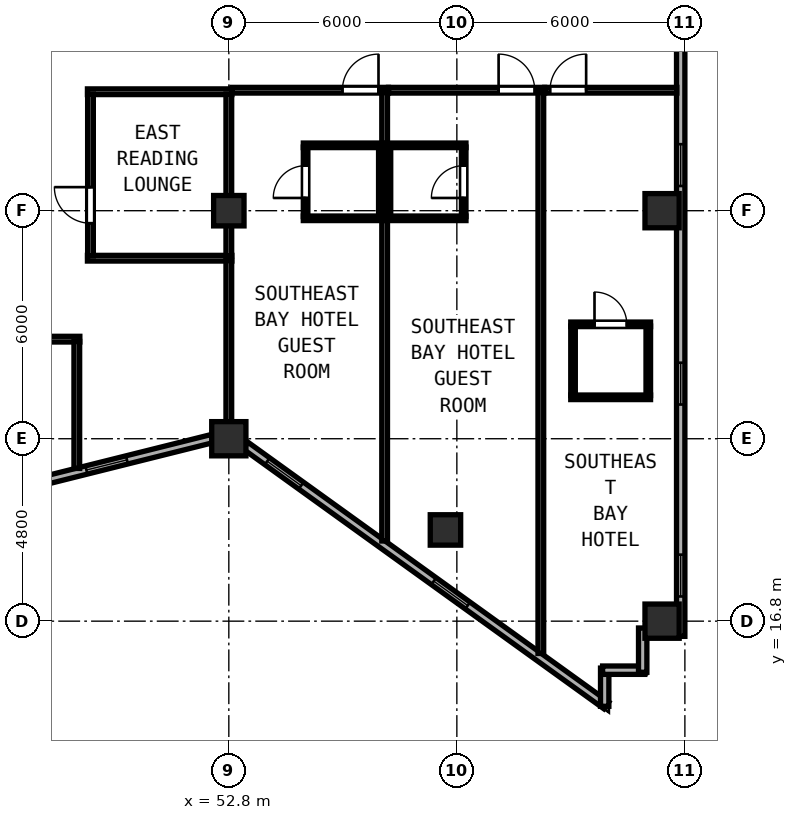
"""IFC4 building model, lengths in metres.
Left out: names, types, materials, properties, quantities, classifications, styles, units other than length and angle.
Written with IfcOpenShell. Run it as: python <this file> out.ifc"""

import sys

from ifc_helpers import new_model, si_unit, direction, frame, frame_2d, origin, origin_2d, place, context, subcontext, project, spatial, rectangle, hollow_rectangle, extrude, element, fill, save


model = new_model("IFC4")
c1 = context("Model", 3, precision=1e-05, world=origin(), true_north=direction((0.0, 1.0)))
c2 = subcontext(c1, "Body", "Model", "MODEL_VIEW")
j1 = project(units=[si_unit("LENGTHUNIT", "METRE"), si_unit("PLANEANGLEUNIT", "RADIAN")], contexts=[c1])
p1 = place(None, origin())
s1 = spatial("IfcSite", under=j1, at=p1, CompositionType="ELEMENT")
p2 = place(p1, origin())
s2 = spatial("IfcBuilding", under=s1, at=p2, CompositionType="ELEMENT")
p3 = place(p2, frame((0.0, 0.0, 223.0)))
s3 = spatial("IfcBuildingStorey", under=s2, at=p3, CompositionType="ELEMENT", Elevation=223.0)
for number, where, z_axis, x_axis in (
    (1, (52.8, 21.6, 0.0), (0.0, 0.0, 1.0), (1.0, 0.0, 0.0)),
    (2, (64.2, 16.8, 0.0), (0.0, 0.0, 1.0), (1.0, 0.0, 0.0)),
    (3, (64.2, 27.6, 0.0), (0.0, 0.0, 1.0), (1.0, 0.0, 0.0)),
):
    element("IfcColumn", number, at=place(p3, frame(where, z_axis=z_axis, x_axis=x_axis)), inside=s3, PredefinedType="COLUMN", context=c2, shape_type="SweptSolid", body=[
        extrude(hollow_rectangle(XDim=0.9, YDim=0.9, WallThickness=0.034, at=origin_2d()), origin(), (0.0, 0.0, 1.0), 3.8),
    ])
for number, where, z_axis, x_axis in (
    (4, (52.8, 27.6, 0.0), (0.0, 0.0, 1.0), (1.0, 0.0, 0.0)),
    (5, (58.5, 19.2, 0.0), (0.0, 0.0, 1.0), (1.0, 0.0, 0.0)),
):
    element("IfcColumn", number, at=place(p3, frame(where, z_axis=z_axis, x_axis=x_axis)), inside=s3, PredefinedType="COLUMN", context=c2, shape_type="SweptSolid", body=[
        extrude(hollow_rectangle(XDim=0.8, YDim=0.8, WallThickness=0.03, at=origin_2d()), origin(), (0.0, 0.0, 1.0), 3.8),
    ])
p4 = place(p3, frame((47.933, 20.497, 0.0), z_axis=(0.0, 0.0, 1.0), x_axis=(0.970142500145, 0.242535625036, 0.0)))
e6 = element("IfcWall", 6, at=p4, inside=s3, PredefinedType="SOLIDWALL", context=c2, shape_type="SweptSolid", body=[
    extrude(rectangle(XDim=4.561, YDim=0.22, at=frame_2d((2.281, 0.0))), origin(), (0.0, 0.0, 1.0), 3.215),
])
p5 = place(p4, frame((1.154, 0.0, 0.85)))
e7 = element("IfcOpeningElement", 7, at=p5, cuts=e6, PredefinedType="OPENING", context=c2, shape_type="SweptSolid", body=[
    extrude(rectangle(XDim=1.1, YDim=1.75, at=frame_2d((0.55, 0.875))), frame((0.0, 0.12, 0.0), z_axis=(0.0, -1.0, 0.0), x_axis=(1.0, 0.0, 0.0)), (0.0, 0.0, 1.0), 0.24),
])
p6 = place(p3, frame((53.242, 21.417, 0.0), z_axis=(0.0, 0.0, 1.0), x_axis=(0.811534737332, -0.58430417601, 0.0)))
e8 = element("IfcWall", 8, at=p6, inside=s3, PredefinedType="SOLIDWALL", context=c2, shape_type="SweptSolid", body=[
    extrude(rectangle(XDim=11.697, YDim=0.22, at=frame_2d((5.849, 0.0))), origin(), (0.0, 0.0, 1.0), 3.215),
])
p7 = place(p6, frame((0.7, 0.0, 0.85)))
e9 = element("IfcOpeningElement", 9, at=p7, cuts=e8, PredefinedType="OPENING", context=c2, shape_type="SweptSolid", body=[
    extrude(rectangle(XDim=1.1, YDim=1.75, at=frame_2d((0.55, 0.875))), frame((0.0, 0.12, 0.0), z_axis=(0.0, -1.0, 0.0), x_axis=(1.0, 0.0, 0.0)), (0.0, 0.0, 1.0), 0.24),
])
p8 = place(p6, frame((6.1, 0.0, 0.85)))
e10 = element("IfcOpeningElement", 10, at=p8, cuts=e8, PredefinedType="OPENING", context=c2, shape_type="SweptSolid", body=[
    extrude(rectangle(XDim=1.1, YDim=1.75, at=frame_2d((0.55, 0.875))), frame((0.0, 0.12, 0.0), z_axis=(0.0, -1.0, 0.0), x_axis=(1.0, 0.0, 0.0)), (0.0, 0.0, 1.0), 0.24),
])
p9 = place(p3, frame((62.69, 14.56, 0.0), z_axis=(0.0, 0.0, 1.0), x_axis=(0.0, 1.0, 0.0)))
e11 = element("IfcWall", 11, at=p9, inside=s3, PredefinedType="SOLIDWALL", context=c2, shape_type="SweptSolid", body=[
    extrude(rectangle(XDim=1.005, YDim=0.22, at=frame_2d((0.502, 0.0))), origin(), (0.0, 0.0, 1.0), 3.62),
])
p10 = place(p3, frame((62.635, 15.51, 0.0), z_axis=(0.0, 0.0, 1.0), x_axis=(1.0, 0.0, 0.0)))
e12 = element("IfcWall", 12, at=p10, inside=s3, PredefinedType="SOLIDWALL", context=c2, shape_type="SweptSolid", body=[
    extrude(rectangle(XDim=1.11, YDim=0.22, at=frame_2d((0.555, 0.0))), origin(), (0.0, 0.0, 1.0), 3.62),
])
p11 = place(p3, frame((63.69, 15.455, 0.0), z_axis=(0.0, 0.0, 1.0), x_axis=(0.0, 1.0, 0.0)))
e13 = element("IfcWall", 13, at=p11, inside=s3, PredefinedType="SOLIDWALL", context=c2, shape_type="SweptSolid", body=[
    extrude(rectangle(XDim=1.165, YDim=0.22, at=frame_2d((0.583, 0.0))), origin(), (0.0, 0.0, 1.0), 3.62),
])
p12 = place(p3, frame((64.69, 16.4, 0.0), z_axis=(0.0, 0.0, 1.0), x_axis=(0.0, 1.0, 0.0)))
e14 = element("IfcWall", 14, at=p12, inside=s3, PredefinedType="SOLIDWALL", context=c2, shape_type="SweptSolid", body=[
    extrude(rectangle(XDim=21.145, YDim=0.22, at=frame_2d((10.573, 0.0))), origin(), (0.0, 0.0, 1.0), 3.62),
])
p13 = place(p12, frame((1.05, 0.0, 0.85)))
e15 = element("IfcOpeningElement", 15, at=p13, cuts=e14, PredefinedType="OPENING", context=c2, shape_type="SweptSolid", body=[
    extrude(rectangle(XDim=1.1, YDim=1.75, at=frame_2d((0.55, 0.875))), frame((0.0, 0.12, 0.0), z_axis=(0.0, -1.0, 0.0), x_axis=(1.0, 0.0, 0.0)), (0.0, 0.0, 1.0), 0.24),
])
p14 = place(p12, frame((6.1, 0.0, 0.85)))
e16 = element("IfcOpeningElement", 16, at=p14, cuts=e14, PredefinedType="OPENING", context=c2, shape_type="SweptSolid", body=[
    extrude(rectangle(XDim=1.1, YDim=1.75, at=frame_2d((0.55, 0.875))), frame((0.0, 0.12, 0.0), z_axis=(0.0, -1.0, 0.0), x_axis=(1.0, 0.0, 0.0)), (0.0, 0.0, 1.0), 0.24),
])
p15 = place(p12, frame((11.85, 0.0, 0.85)))
e17 = element("IfcOpeningElement", 17, at=p15, cuts=e14, PredefinedType="OPENING", context=c2, shape_type="SweptSolid", body=[
    extrude(rectangle(XDim=1.1, YDim=1.75, at=frame_2d((0.55, 0.875))), frame((0.0, 0.12, 0.0), z_axis=(0.0, -1.0, 0.0), x_axis=(1.0, 0.0, 0.0)), (0.0, 0.0, 1.0), 0.24),
])
p16 = place(p12, frame((16.9, 0.0, 0.85)))
e18 = element("IfcOpeningElement", 18, at=p16, cuts=e14, PredefinedType="OPENING", context=c2, shape_type="SweptSolid", body=[
    extrude(rectangle(XDim=1.1, YDim=1.75, at=frame_2d((0.55, 0.875))), frame((0.0, 0.12, 0.0), z_axis=(0.0, -1.0, 0.0), x_axis=(1.0, 0.0, 0.0)), (0.0, 0.0, 1.0), 0.24),
])
for number, where, z_axis, x_axis in (
    (19, (49.08, 30.73, 0.0), (0.0, 0.0, 1.0), (1.0, 0.0, 0.0)),
    (20, (49.08, 26.35, 0.0), (0.0, 0.0, 1.0), (1.0, 0.0, 0.0)),
):
    element("IfcWall", number, at=place(p3, frame(where, z_axis=z_axis, x_axis=x_axis)), inside=s3, PredefinedType="PARTITIONING", context=c2, shape_type="SweptSolid", body=[
        extrude(rectangle(XDim=3.8, YDim=0.15, at=frame_2d((1.9, 0.0))), origin(), (0.0, 0.0, 1.0), 3.62),
    ])
p17 = place(p3, frame((49.16, 26.41, 0.0), z_axis=(0.0, 0.0, 1.0), x_axis=(0.0, 1.0, 0.0)))
e21 = element("IfcWall", 21, at=p17, inside=s3, PredefinedType="PARTITIONING", context=c2, shape_type="SweptSolid", body=[
    extrude(rectangle(XDim=4.26, YDim=0.15, at=frame_2d((2.13, 0.0))), origin(), (0.0, 0.0, 1.0), 3.62),
])
p18 = place(p17, frame((0.86, 0.0, 0.0)))
e22 = element("IfcOpeningElement", 22, at=p18, cuts=e21, PredefinedType="OPENING", context=c2, shape_type="SweptSolid", body=[
    extrude(rectangle(XDim=0.95, YDim=2.12, at=frame_2d((0.475, 1.06))), frame((0.0, 0.085, 0.0), z_axis=(0.0, -1.0, 0.0), x_axis=(1.0, 0.0, 0.0)), (0.0, 0.0, 1.0), 0.17),
])
p19 = place(p3, frame((52.8, 26.41, 0.0), z_axis=(0.0, 0.0, 1.0), x_axis=(0.0, 1.0, 0.0)))
e23 = element("IfcWall", 23, at=p19, inside=s3, PredefinedType="PARTITIONING", context=c2, shape_type="SweptSolid", body=[
    extrude(rectangle(XDim=4.26, YDim=0.15, at=frame_2d((2.13, 0.0))), origin(), (0.0, 0.0, 1.0), 3.215),
])
p20 = place(p3, frame((41.682, 24.22, 0.0), z_axis=(0.0, 0.0, 1.0), x_axis=(1.0, 0.0, 0.0)))
e24 = element("IfcWall", 24, at=p20, inside=s3, PredefinedType="PARTITIONING", context=c2, shape_type="SweptSolid", body=[
    extrude(rectangle(XDim=7.198, YDim=0.15, at=frame_2d((3.599, 0.0))), origin(), (0.0, 0.0, 1.0), 3.62),
])
p21 = place(p20, frame((3.913, 0.0, 0.0), z_axis=(0.0, 0.0, 1.0), x_axis=(-1.0, 0.0, 0.0)))
e25 = element("IfcOpeningElement", 25, at=p21, cuts=e24, PredefinedType="OPENING", context=c2, shape_type="SweptSolid", body=[
    extrude(rectangle(XDim=0.95, YDim=2.12, at=frame_2d((0.475, 1.06))), frame((0.0, 0.085, 0.0), z_axis=(0.0, -1.0, 0.0), x_axis=(1.0, 0.0, 0.0)), (0.0, 0.0, 1.0), 0.17),
])
p22 = place(p3, frame((48.8, 20.819, 0.0), z_axis=(0.0, 0.0, 1.0), x_axis=(0.0, 1.0, 0.0)))
e26 = element("IfcWall", 26, at=p22, inside=s3, PredefinedType="PARTITIONING", context=c2, shape_type="SweptSolid", body=[
    extrude(rectangle(XDim=3.341, YDim=0.15, at=frame_2d((1.671, 0.0))), origin(), (0.0, 0.0, 1.0), 3.62),
])
p23 = place(p3, frame((52.882, 30.77, 0.0), z_axis=(0.0, 0.0, 1.0), x_axis=(1.0, 0.0, 0.0)))
e27 = element("IfcWall", 27, at=p23, inside=s3, PredefinedType="PARTITIONING", context=c2, shape_type="SweptSolid", body=[
    extrude(rectangle(XDim=4.118, YDim=0.15, at=frame_2d((2.059, 0.0))), origin(), (0.0, 0.0, 1.0), 3.62),
])
p24 = place(p23, frame((3.856, 0.0, 0.0), z_axis=(0.0, 0.0, 1.0), x_axis=(-1.0, 0.0, 0.0)))
e28 = element("IfcOpeningElement", 28, at=p24, cuts=e27, PredefinedType="OPENING", context=c2, shape_type="SweptSolid", body=[
    extrude(rectangle(XDim=0.95, YDim=2.15, at=frame_2d((0.475, 1.075))), frame((0.0, 0.085, 0.0), z_axis=(0.0, -1.0, 0.0), x_axis=(1.0, 0.0, 0.0)), (0.0, 0.0, 1.0), 0.17),
])
p25 = place(p3, frame((52.8, 21.819, 0.0), z_axis=(0.0, 0.0, 1.0), x_axis=(0.0, 1.0, 0.0)))
e29 = element("IfcWall", 29, at=p25, inside=s3, PredefinedType="PARTITIONING", context=c2, shape_type="SweptSolid", body=[
    extrude(rectangle(XDim=4.471, YDim=0.15, at=frame_2d((2.236, 0.0))), origin(), (0.0, 0.0, 1.0), 3.215),
])
p26 = place(p3, frame((56.9, 18.909, 0.0), z_axis=(0.0, 0.0, 1.0), x_axis=(0.0, 1.0, 0.0)))
e30 = element("IfcWall", 30, at=p26, inside=s3, PredefinedType="PARTITIONING", context=c2, shape_type="SweptSolid", body=[
    extrude(rectangle(XDim=11.801, YDim=0.15, at=frame_2d((5.9, 0.0))), origin(), (0.0, 0.0, 1.0), 3.62),
])
p27 = place(p3, frame((54.76, 29.32, 0.0), z_axis=(0.0, 0.0, 1.0), x_axis=(1.0, 0.0, 0.0)))
e31 = element("IfcWall", 31, at=p27, inside=s3, PredefinedType="PARTITIONING", context=c2, shape_type="SweptSolid", body=[
    extrude(rectangle(XDim=2.08, YDim=0.12, at=frame_2d((1.04, 0.0))), origin(), (0.0, 0.0, 1.0), 3.62),
])
p28 = place(p3, frame((54.76, 27.4, 0.0), z_axis=(0.0, 0.0, 1.0), x_axis=(1.0, 0.0, 0.0)))
e32 = element("IfcWall", 32, at=p28, inside=s3, PredefinedType="PARTITIONING", context=c2, shape_type="SweptSolid", body=[
    extrude(rectangle(XDim=2.08, YDim=0.12, at=frame_2d((1.04, 0.0))), origin(), (0.0, 0.0, 1.0), 3.215),
])
p29 = place(p3, frame((54.82, 27.445, 0.0), z_axis=(0.0, 0.0, 1.0), x_axis=(0.0, 1.0, 0.0)))
e33 = element("IfcWall", 33, at=p29, inside=s3, PredefinedType="PARTITIONING", context=c2, shape_type="SweptSolid", body=[
    extrude(rectangle(XDim=1.83, YDim=0.12, at=frame_2d((0.915, 0.0))), origin(), (0.0, 0.0, 1.0), 3.62),
])
p30 = place(p29, frame((1.34, 0.0, 0.0), z_axis=(0.0, 0.0, 1.0), x_axis=(-1.0, 0.0, 0.0)))
e34 = element("IfcOpeningElement", 34, at=p30, cuts=e33, PredefinedType="OPENING", context=c2, shape_type="SweptSolid", body=[
    extrude(rectangle(XDim=0.85, YDim=2.1, at=frame_2d((0.425, 1.05))), frame((0.0, 0.07, 0.0), z_axis=(0.0, -1.0, 0.0), x_axis=(1.0, 0.0, 0.0)), (0.0, 0.0, 1.0), 0.14),
])
p31 = place(p3, frame((56.8, 27.445, 0.0), z_axis=(0.0, 0.0, 1.0), x_axis=(0.0, 1.0, 0.0)))
e35 = element("IfcWall", 35, at=p31, inside=s3, PredefinedType="PARTITIONING", context=c2, shape_type="SweptSolid", body=[
    extrude(rectangle(XDim=1.83, YDim=0.12, at=frame_2d((0.915, 0.0))), origin(), (0.0, 0.0, 1.0), 3.62),
])
p32 = place(p3, frame((57.002, 30.77, 0.0), z_axis=(0.0, 0.0, 1.0), x_axis=(1.0, 0.0, 0.0)))
e36 = element("IfcWall", 36, at=p32, inside=s3, PredefinedType="PARTITIONING", context=c2, shape_type="SweptSolid", body=[
    extrude(rectangle(XDim=4.108, YDim=0.15, at=frame_2d((2.054, 0.0))), origin(), (0.0, 0.0, 1.0), 3.62),
])
p33 = place(p32, frame((3.846, 0.0, 0.0), z_axis=(0.0, 0.0, 1.0), x_axis=(-1.0, 0.0, 0.0)))
e37 = element("IfcOpeningElement", 37, at=p33, cuts=e36, PredefinedType="OPENING", context=c2, shape_type="SweptSolid", body=[
    extrude(rectangle(XDim=0.95, YDim=2.15, at=frame_2d((0.475, 1.075))), frame((0.0, 0.085, 0.0), z_axis=(0.0, -1.0, 0.0), x_axis=(1.0, 0.0, 0.0)), (0.0, 0.0, 1.0), 0.17),
])
p34 = place(p3, frame((61.01, 15.95, 0.0), z_axis=(0.0, 0.0, 1.0), x_axis=(0.0, 1.0, 0.0)))
e38 = element("IfcWall", 38, at=p34, inside=s3, PredefinedType="PARTITIONING", context=c2, shape_type="SweptSolid", body=[
    extrude(rectangle(XDim=14.76, YDim=0.15, at=frame_2d((7.38, 0.0))), origin(), (0.0, 0.0, 1.0), 3.62),
])
p35 = place(p3, frame((56.96, 29.32, 0.0), z_axis=(0.0, 0.0, 1.0), x_axis=(1.0, 0.0, 0.0)))
e39 = element("IfcWall", 39, at=p35, inside=s3, PredefinedType="PARTITIONING", context=c2, shape_type="SweptSolid", body=[
    extrude(rectangle(XDim=2.08, YDim=0.12, at=frame_2d((1.04, 0.0))), origin(), (0.0, 0.0, 1.0), 3.62),
])
p36 = place(p3, frame((56.96, 27.4, 0.0), z_axis=(0.0, 0.0, 1.0), x_axis=(1.0, 0.0, 0.0)))
e40 = element("IfcWall", 40, at=p36, inside=s3, PredefinedType="PARTITIONING", context=c2, shape_type="SweptSolid", body=[
    extrude(rectangle(XDim=2.08, YDim=0.12, at=frame_2d((1.04, 0.0))), origin(), (0.0, 0.0, 1.0), 3.215),
])
p37 = place(p3, frame((57.0, 27.445, 0.0), z_axis=(0.0, 0.0, 1.0), x_axis=(0.0, 1.0, 0.0)))
e41 = element("IfcWall", 41, at=p37, inside=s3, PredefinedType="PARTITIONING", context=c2, shape_type="SweptSolid", body=[
    extrude(rectangle(XDim=1.83, YDim=0.12, at=frame_2d((0.915, 0.0))), origin(), (0.0, 0.0, 1.0), 3.62),
])
p38 = place(p3, frame((58.98, 27.445, 0.0), z_axis=(0.0, 0.0, 1.0), x_axis=(0.0, 1.0, 0.0)))
e42 = element("IfcWall", 42, at=p38, inside=s3, PredefinedType="PARTITIONING", context=c2, shape_type="SweptSolid", body=[
    extrude(rectangle(XDim=1.83, YDim=0.12, at=frame_2d((0.915, 0.0))), origin(), (0.0, 0.0, 1.0), 3.62),
])
p39 = place(p38, frame((0.49, 0.0, 0.0)))
e43 = element("IfcOpeningElement", 43, at=p39, cuts=e42, PredefinedType="OPENING", context=c2, shape_type="SweptSolid", body=[
    extrude(rectangle(XDim=0.85, YDim=2.1, at=frame_2d((0.425, 1.05))), frame((0.0, 0.07, 0.0), z_axis=(0.0, -1.0, 0.0), x_axis=(1.0, 0.0, 0.0)), (0.0, 0.0, 1.0), 0.14),
])
p40 = place(p3, frame((61.112, 30.77, 0.0), z_axis=(0.0, 0.0, 1.0), x_axis=(1.0, 0.0, 0.0)))
e44 = element("IfcWall", 44, at=p40, inside=s3, PredefinedType="PARTITIONING", context=c2, shape_type="SweptSolid", body=[
    extrude(rectangle(XDim=3.476, YDim=0.15, at=frame_2d((1.738, 0.0))), origin(), (0.0, 0.0, 1.0), 3.62),
])
p41 = place(p40, frame((1.09, 0.0, 0.0), z_axis=(0.0, 0.0, 1.0), x_axis=(-1.0, 0.0, 0.0)))
e45 = element("IfcOpeningElement", 45, at=p41, cuts=e44, PredefinedType="OPENING", context=c2, shape_type="SweptSolid", body=[
    extrude(rectangle(XDim=0.95, YDim=2.15, at=frame_2d((0.475, 1.075))), frame((0.0, 0.085, 0.0), z_axis=(0.0, -1.0, 0.0), x_axis=(1.0, 0.0, 0.0)), (0.0, 0.0, 1.0), 0.17),
])
p42 = place(p3, frame((61.797, 24.61, 0.0), z_axis=(0.0, 0.0, 1.0), x_axis=(1.0, 0.0, 0.0)))
e46 = element("IfcWall", 46, at=p42, inside=s3, PredefinedType="PARTITIONING", context=c2, shape_type="SweptSolid", body=[
    extrude(rectangle(XDim=2.1, YDim=0.12, at=frame_2d((1.05, 0.0))), origin(), (0.0, 0.0, 1.0), 3.62),
])
p43 = place(p42, frame((1.475, 0.0, 0.0), z_axis=(0.0, 0.0, 1.0), x_axis=(-1.0, 0.0, 0.0)))
e47 = element("IfcOpeningElement", 47, at=p43, cuts=e46, PredefinedType="OPENING", context=c2, shape_type="SweptSolid", body=[
    extrude(rectangle(XDim=0.85, YDim=2.1, at=frame_2d((0.425, 1.05))), frame((0.0, 0.07, 0.0), z_axis=(0.0, -1.0, 0.0), x_axis=(1.0, 0.0, 0.0)), (0.0, 0.0, 1.0), 0.14),
])
p44 = place(p3, frame((61.797, 22.69, 0.0), z_axis=(0.0, 0.0, 1.0), x_axis=(1.0, 0.0, 0.0)))
e48 = element("IfcWall", 48, at=p44, inside=s3, PredefinedType="PARTITIONING", context=c2, shape_type="SweptSolid", body=[
    extrude(rectangle(XDim=2.1, YDim=0.12, at=frame_2d((1.05, 0.0))), origin(), (0.0, 0.0, 1.0), 3.62),
])
for number, where, z_axis, x_axis in (
    (49, (61.857, 22.735, 0.0), (0.0, 0.0, 1.0), (0.0, 1.0, 0.0)),
    (50, (63.837, 22.735, 0.0), (0.0, 0.0, 1.0), (0.0, 1.0, 0.0)),
):
    element("IfcWall", number, at=place(p3, frame(where, z_axis=z_axis, x_axis=x_axis)), inside=s3, PredefinedType="PARTITIONING", context=c2, shape_type="SweptSolid", body=[
        extrude(rectangle(XDim=1.83, YDim=0.12, at=frame_2d((0.915, 0.0))), origin(), (0.0, 0.0, 1.0), 3.62),
    ])
p45 = place(p5, origin())
e51 = element("IfcWindow", 51, at=p45, inside=s3, PartitioningType="SINGLE_PANEL", PredefinedType="WINDOW", context=c2, shape_type="SweptSolid", body=[
    extrude(rectangle(XDim=1.1, YDim=1.75, at=frame_2d((0.55, 0.875))), frame((0.0, 0.03, 0.0), z_axis=(0.0, -1.0, 0.0), x_axis=(1.0, 0.0, 0.0)), (0.0, 0.0, 1.0), 0.06),
])
fill(e7, e51)
p46 = place(p7, origin())
e52 = element("IfcWindow", 52, at=p46, inside=s3, PartitioningType="SINGLE_PANEL", PredefinedType="WINDOW", context=c2, shape_type="SweptSolid", body=[
    extrude(rectangle(XDim=1.1, YDim=1.75, at=frame_2d((0.55, 0.875))), frame((0.0, 0.03, 0.0), z_axis=(0.0, -1.0, 0.0), x_axis=(1.0, 0.0, 0.0)), (0.0, 0.0, 1.0), 0.06),
])
fill(e9, e52)
p47 = place(p8, origin())
e53 = element("IfcWindow", 53, at=p47, inside=s3, PartitioningType="SINGLE_PANEL", PredefinedType="WINDOW", context=c2, shape_type="SweptSolid", body=[
    extrude(rectangle(XDim=1.1, YDim=1.75, at=frame_2d((0.55, 0.875))), frame((0.0, 0.03, 0.0), z_axis=(0.0, -1.0, 0.0), x_axis=(1.0, 0.0, 0.0)), (0.0, 0.0, 1.0), 0.06),
])
fill(e10, e53)
p48 = place(p13, origin())
e54 = element("IfcWindow", 54, at=p48, inside=s3, PartitioningType="SINGLE_PANEL", PredefinedType="WINDOW", context=c2, shape_type="SweptSolid", body=[
    extrude(rectangle(XDim=1.1, YDim=1.75, at=frame_2d((0.55, 0.875))), frame((0.0, 0.03, 0.0), z_axis=(0.0, -1.0, 0.0), x_axis=(1.0, 0.0, 0.0)), (0.0, 0.0, 1.0), 0.06),
])
fill(e15, e54)
p49 = place(p14, origin())
e55 = element("IfcWindow", 55, at=p49, inside=s3, PartitioningType="SINGLE_PANEL", PredefinedType="WINDOW", context=c2, shape_type="SweptSolid", body=[
    extrude(rectangle(XDim=1.1, YDim=1.75, at=frame_2d((0.55, 0.875))), frame((0.0, 0.03, 0.0), z_axis=(0.0, -1.0, 0.0), x_axis=(1.0, 0.0, 0.0)), (0.0, 0.0, 1.0), 0.06),
])
fill(e16, e55)
p50 = place(p15, origin())
e56 = element("IfcWindow", 56, at=p50, inside=s3, PartitioningType="SINGLE_PANEL", PredefinedType="WINDOW", context=c2, shape_type="SweptSolid", body=[
    extrude(rectangle(XDim=1.1, YDim=1.75, at=frame_2d((0.55, 0.875))), frame((0.0, 0.03, 0.0), z_axis=(0.0, -1.0, 0.0), x_axis=(1.0, 0.0, 0.0)), (0.0, 0.0, 1.0), 0.06),
])
fill(e17, e56)
p51 = place(p18, origin())
e57 = element("IfcDoor", 57, at=p51, inside=s3, OperationType="SINGLE_SWING_RIGHT", PredefinedType="DOOR", context=c2, shape_type="SweptSolid", body=[
    extrude(rectangle(XDim=0.95, YDim=2.12, at=frame_2d((0.475, 1.06))), frame((0.0, 0.025, 0.0), z_axis=(0.0, -1.0, 0.0), x_axis=(1.0, 0.0, 0.0)), (0.0, 0.0, 1.0), 0.05),
])
fill(e22, e57)
p52 = place(p24, origin())
e58 = element("IfcDoor", 58, at=p52, inside=s3, OperationType="SINGLE_SWING_LEFT", PredefinedType="DOOR", context=c2, shape_type="SweptSolid", body=[
    extrude(rectangle(XDim=0.95, YDim=2.15, at=frame_2d((0.475, 1.075))), frame((0.0, 0.025, 0.0), z_axis=(0.0, -1.0, 0.0), x_axis=(1.0, 0.0, 0.0)), (0.0, 0.0, 1.0), 0.05),
])
fill(e28, e58)
p53 = place(p30, origin())
e59 = element("IfcDoor", 59, at=p53, inside=s3, OperationType="SINGLE_SWING_RIGHT", PredefinedType="DOOR", context=c2, shape_type="SweptSolid", body=[
    extrude(rectangle(XDim=0.85, YDim=2.1, at=frame_2d((0.425, 1.05))), frame((0.0, 0.025, 0.0), z_axis=(0.0, -1.0, 0.0), x_axis=(1.0, 0.0, 0.0)), (0.0, 0.0, 1.0), 0.05),
])
fill(e34, e59)
p54 = place(p33, origin())
e60 = element("IfcDoor", 60, at=p54, inside=s3, OperationType="SINGLE_SWING_RIGHT", PredefinedType="DOOR", context=c2, shape_type="SweptSolid", body=[
    extrude(rectangle(XDim=0.95, YDim=2.15, at=frame_2d((0.475, 1.075))), frame((0.0, 0.025, 0.0), z_axis=(0.0, -1.0, 0.0), x_axis=(1.0, 0.0, 0.0)), (0.0, 0.0, 1.0), 0.05),
])
fill(e37, e60)
p55 = place(p39, origin())
e61 = element("IfcDoor", 61, at=p55, inside=s3, OperationType="SINGLE_SWING_LEFT", PredefinedType="DOOR", context=c2, shape_type="SweptSolid", body=[
    extrude(rectangle(XDim=0.85, YDim=2.1, at=frame_2d((0.425, 1.05))), frame((0.0, 0.025, 0.0), z_axis=(0.0, -1.0, 0.0), x_axis=(1.0, 0.0, 0.0)), (0.0, 0.0, 1.0), 0.05),
])
fill(e43, e61)
p56 = place(p41, origin())
e62 = element("IfcDoor", 62, at=p56, inside=s3, OperationType="SINGLE_SWING_LEFT", PredefinedType="DOOR", context=c2, shape_type="SweptSolid", body=[
    extrude(rectangle(XDim=0.95, YDim=2.15, at=frame_2d((0.475, 1.075))), frame((0.0, 0.025, 0.0), z_axis=(0.0, -1.0, 0.0), x_axis=(1.0, 0.0, 0.0)), (0.0, 0.0, 1.0), 0.05),
])
fill(e45, e62)
p57 = place(p43, origin())
e63 = element("IfcDoor", 63, at=p57, inside=s3, OperationType="SINGLE_SWING_RIGHT", PredefinedType="DOOR", context=c2, shape_type="SweptSolid", body=[
    extrude(rectangle(XDim=0.85, YDim=2.1, at=frame_2d((0.425, 1.05))), frame((0.0, 0.025, 0.0), z_axis=(0.0, -1.0, 0.0), x_axis=(1.0, 0.0, 0.0)), (0.0, 0.0, 1.0), 0.05),
])
fill(e47, e63)
save(model, sys.argv[1])
